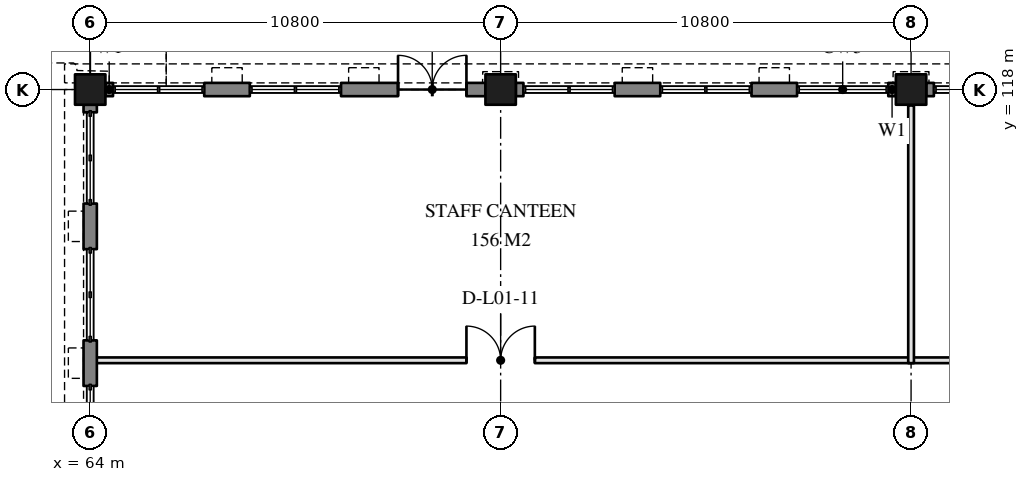
"""IFC4 building model, lengths in metres.
Left out: names, types, materials, properties, quantities, classifications, styles, units other than length and angle.
Written with IfcOpenShell. Run it as: python <this file> out.ifc"""

import sys

from ifc_helpers import new_model, si_unit, direction, frame, frame_2d, origin, origin_2d, place, context, subcontext, project, spatial, rectangle, extrude, element, fill, save


model = new_model("IFC4")
c1 = context("Model", 3, precision=1e-05, world=origin(), true_north=direction((0.0, 1.0)))
c2 = subcontext(c1, "Body", "Model", "MODEL_VIEW")
j1 = project(units=[si_unit("LENGTHUNIT", "METRE"), si_unit("PLANEANGLEUNIT", "RADIAN")], contexts=[c1])
p1 = place(None, origin())
s1 = spatial("IfcSite", under=j1, at=p1, CompositionType="ELEMENT")
p2 = place(p1, origin())
s2 = spatial("IfcBuilding", under=s1, at=p2, CompositionType="ELEMENT")
p3 = place(p2, frame((0.0, 0.0, 4.8)))
s3 = spatial("IfcBuildingStorey", under=s2, at=p3, CompositionType="ELEMENT", Elevation=4.8)
for number, where, z_axis, x_axis in (
    (1, (64.0, 118.0, -1.3), (0.0, 0.0, 1.0), (1.0, 0.0, 0.0)),
    (2, (74.8, 118.0, -1.3), (0.0, 0.0, 1.0), (1.0, 0.0, 0.0)),
    (3, (85.6, 118.0, -1.3), (0.0, 0.0, 1.0), (1.0, 0.0, 0.0)),
):
    element("IfcColumn", number, at=place(p3, frame(where, z_axis=z_axis, x_axis=x_axis)), inside=s3, PredefinedType="COLUMN", context=c2, shape_type="SweptSolid", body=[
        extrude(rectangle(XDim=0.8, YDim=0.8, at=origin_2d()), origin(), (0.0, 0.0, 1.0), 5.2),
    ])
p4 = place(p3, frame((64.4, 118.0, 0.0), z_axis=(0.0, 0.0, 1.0), x_axis=(1.0, 0.0, 0.0)))
e4 = element("IfcWall", 4, at=p4, inside=s3, PredefinedType="SOLIDWALL", context=c2, shape_type="SweptSolid", body=[
    extrude(rectangle(XDim=0.2, YDim=0.35, at=frame_2d((0.1, 0.0))), origin(), (0.0, 0.0, 1.0), 3.6),
])
p5 = place(p3, frame((67.0, 118.0, 0.0), z_axis=(0.0, 0.0, 1.0), x_axis=(1.0, 0.0, 0.0)))
e5 = element("IfcWall", 5, at=p5, inside=s3, PredefinedType="SOLIDWALL", context=c2, shape_type="SweptSolid", body=[
    extrude(rectangle(XDim=1.2, YDim=0.35, at=frame_2d((0.6, 0.0))), origin(), (0.0, 0.0, 1.0), 2.8),
])
p6 = place(p3, frame((70.6, 118.0, 0.0), z_axis=(0.0, 0.0, 1.0), x_axis=(1.0, 0.0, 0.0)))
e6 = element("IfcWall", 6, at=p6, inside=s3, PredefinedType="SOLIDWALL", context=c2, shape_type="SweptSolid", body=[
    extrude(rectangle(XDim=3.8, YDim=0.35, at=frame_2d((1.9, 0.0))), origin(), (0.0, 0.0, 1.0), 2.8),
])
p7 = place(p6, frame((1.5, 0.0, 0.0)))
e7 = element("IfcOpeningElement", 7, at=p7, cuts=e6, PredefinedType="OPENING", context=c2, shape_type="SweptSolid", body=[
    extrude(rectangle(XDim=1.8, YDim=2.4, at=frame_2d((0.9, 1.2))), frame((0.0, 0.185, 0.0), z_axis=(0.0, -1.0, 0.0), x_axis=(1.0, 0.0, 0.0)), (0.0, 0.0, 1.0), 0.37),
])
p8 = place(p3, frame((75.2, 118.0, 0.0), z_axis=(0.0, 0.0, 1.0), x_axis=(1.0, 0.0, 0.0)))
e8 = element("IfcWall", 8, at=p8, inside=s3, PredefinedType="SOLIDWALL", context=c2, shape_type="SweptSolid", body=[
    extrude(rectangle(XDim=0.2, YDim=0.35, at=frame_2d((0.1, 0.0))), origin(), (0.0, 0.0, 1.0), 3.6),
])
p9 = place(p3, frame((77.8, 118.0, 0.0), z_axis=(0.0, 0.0, 1.0), x_axis=(1.0, 0.0, 0.0)))
e9 = element("IfcWall", 9, at=p9, inside=s3, PredefinedType="SOLIDWALL", context=c2, shape_type="SweptSolid", body=[
    extrude(rectangle(XDim=1.2, YDim=0.35, at=frame_2d((0.6, 0.0))), origin(), (0.0, 0.0, 1.0), 2.8),
])
p10 = place(p3, frame((81.4, 118.0, 0.0), z_axis=(0.0, 0.0, 1.0), x_axis=(1.0, 0.0, 0.0)))
e10 = element("IfcWall", 10, at=p10, inside=s3, PredefinedType="SOLIDWALL", context=c2, shape_type="SweptSolid", body=[
    extrude(rectangle(XDim=1.2, YDim=0.35, at=frame_2d((0.6, 0.0))), origin(), (0.0, 0.0, 1.0), 2.8),
])
for number, where, z_axis, x_axis in (
    (11, (85.0, 118.0, 0.0), (0.0, 0.0, 1.0), (1.0, 0.0, 0.0)),
    (12, (86.0, 118.0, 0.0), (0.0, 0.0, 1.0), (1.0, 0.0, 0.0)),
):
    element("IfcWall", number, at=place(p3, frame(where, z_axis=z_axis, x_axis=x_axis)), inside=s3, PredefinedType="SOLIDWALL", context=c2, shape_type="SweptSolid", body=[
        extrude(rectangle(XDim=0.2, YDim=0.35, at=frame_2d((0.1, 0.0))), origin(), (0.0, 0.0, 1.0), 3.6),
    ])
for number, where, z_axis, x_axis in (
    (13, (64.0, 110.2, 0.0), (0.0, 0.0, 1.0), (0.0, 1.0, 0.0)),
    (14, (64.0, 113.8, 0.0), (0.0, 0.0, 1.0), (0.0, 1.0, 0.0)),
):
    element("IfcWall", number, at=place(p3, frame(where, z_axis=z_axis, x_axis=x_axis)), inside=s3, PredefinedType="SOLIDWALL", context=c2, shape_type="SweptSolid", body=[
        extrude(rectangle(XDim=1.2, YDim=0.35, at=frame_2d((0.6, 0.0))), origin(), (0.0, 0.0, 1.0), 2.8),
    ])
p11 = place(p3, frame((64.0, 117.4, 0.0), z_axis=(0.0, 0.0, 1.0), x_axis=(0.0, 1.0, 0.0)))
e15 = element("IfcWall", 15, at=p11, inside=s3, PredefinedType="SOLIDWALL", context=c2, shape_type="SweptSolid", body=[
    extrude(rectangle(XDim=0.2, YDim=0.35, at=frame_2d((0.1, 0.0))), origin(), (0.0, 0.0, 1.0), 3.6),
])
p12 = place(p3, frame((64.0, 110.875, 0.0), z_axis=(0.0, 0.0, 1.0), x_axis=(1.0, 0.0, 0.0)))
e16 = element("IfcWall", 16, at=p12, inside=s3, PredefinedType="PARTITIONING", context=c2, shape_type="SweptSolid", body=[
    extrude(rectangle(XDim=21.6, YDim=0.15, at=frame_2d((10.8, 0.0))), origin(), (0.0, 0.0, 1.0), 2.8),
])
p13 = place(p12, frame((9.9, 0.0, 0.0)))
e17 = element("IfcOpeningElement", 17, at=p13, cuts=e16, PredefinedType="OPENING", context=c2, shape_type="SweptSolid", body=[
    extrude(rectangle(XDim=1.8, YDim=2.1, at=frame_2d((0.9, 1.05))), frame((0.0, 0.085, 0.0), z_axis=(0.0, -1.0, 0.0), x_axis=(1.0, 0.0, 0.0)), (0.0, 0.0, 1.0), 0.17),
])
p14 = place(p3, frame((85.6, 110.875, 0.0), z_axis=(0.0, 0.0, 1.0), x_axis=(1.0, 0.0, 0.0)))
e18 = element("IfcWall", 18, at=p14, inside=s3, PredefinedType="PARTITIONING", context=c2, shape_type="SweptSolid", body=[
    extrude(rectangle(XDim=14.4, YDim=0.15, at=frame_2d((7.2, 0.0))), origin(), (0.0, 0.0, 1.0), 2.8),
])
p15 = place(p14, frame((6.3, 0.0, 0.0)))
e19 = element("IfcOpeningElement", 19, at=p15, cuts=e18, PredefinedType="OPENING", context=c2, shape_type="SweptSolid", body=[
    extrude(rectangle(XDim=1.8, YDim=2.1, at=frame_2d((0.9, 1.05))), frame((0.0, 0.085, 0.0), z_axis=(0.0, -1.0, 0.0), x_axis=(1.0, 0.0, 0.0)), (0.0, 0.0, 1.0), 0.17),
])
p16 = place(p3, frame((85.6, 110.8, 0.0), z_axis=(0.0, 0.0, 1.0), x_axis=(0.0, 1.0, 0.0)))
e20 = element("IfcWall", 20, at=p16, inside=s3, PredefinedType="PARTITIONING", context=c2, shape_type="SweptSolid", body=[
    extrude(rectangle(XDim=6.78, YDim=0.15, at=frame_2d((3.39, 0.0))), origin(), (0.0, 0.0, 1.0), 2.8),
])
p17 = place(p7, origin())
e21 = element("IfcDoor", 21, at=p17, inside=s3, OperationType="DOUBLE_DOOR_DOUBLE_SWING", PredefinedType="DOOR", context=c2, shape_type="SweptSolid", body=[
    extrude(rectangle(XDim=1.8, YDim=2.4, at=frame_2d((0.9, 1.2))), frame((0.0, 0.025, 0.0), z_axis=(0.0, -1.0, 0.0), x_axis=(1.0, 0.0, 0.0)), (0.0, 0.0, 1.0), 0.05),
])
fill(e7, e21)
p18 = place(p13, frame((1.8, 0.0, 0.0), z_axis=(0.0, 0.0, 1.0), x_axis=(-1.0, 0.0, 0.0)))
e22 = element("IfcDoor", 22, at=p18, inside=s3, OperationType="DOUBLE_DOOR_DOUBLE_SWING", PredefinedType="DOOR", context=c2, shape_type="SweptSolid", body=[
    extrude(rectangle(XDim=1.8, YDim=2.1, at=frame_2d((0.9, 1.05))), frame((0.0, 0.025, 0.0), z_axis=(0.0, -1.0, 0.0), x_axis=(1.0, 0.0, 0.0)), (0.0, 0.0, 1.0), 0.05),
])
fill(e17, e22)
save(model, sys.argv[1])
